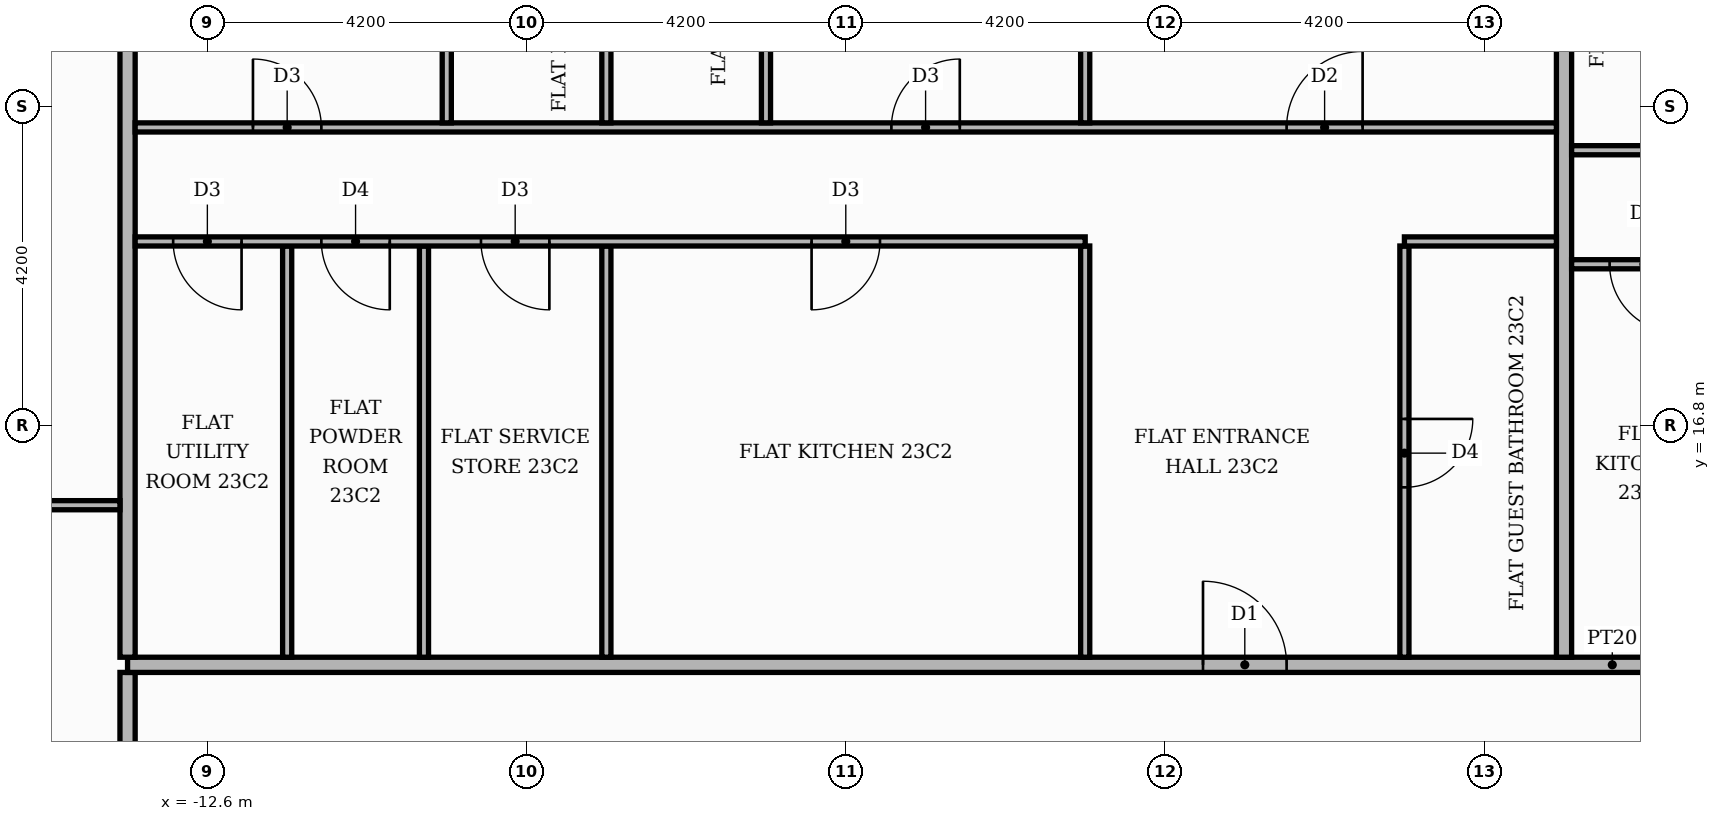
"""IFC4 building model, lengths in metres.
Left out: names, types, materials, properties, quantities, classifications, styles, units other than length and angle.
Written with IfcOpenShell. Run it as: python <this file> out.ifc"""

import sys

from ifc_helpers import new_model, si_unit, direction, frame, frame_2d, origin, place, context, subcontext, project, spatial, rectangle, extrude, element, fill, save


model = new_model("IFC4")
c1 = context("Model", 3, precision=1e-05, world=origin(), true_north=direction((0.0, 1.0)))
c2 = subcontext(c1, "Body", "Model", "MODEL_VIEW")
j1 = project(units=[si_unit("LENGTHUNIT", "METRE"), si_unit("PLANEANGLEUNIT", "RADIAN")], contexts=[c1])
p1 = place(None, origin())
s1 = spatial("IfcSite", under=j1, at=p1, CompositionType="ELEMENT")
p2 = place(p1, origin())
s2 = spatial("IfcBuilding", under=s1, at=p2, CompositionType="ELEMENT")
p3 = place(p2, frame((0.0, 0.0, 98.7)))
s3 = spatial("IfcBuildingStorey", under=s2, at=p3, CompositionType="ELEMENT", Elevation=98.7)
p4 = place(p3, frame((-13.65, -13.55, 0.0), z_axis=(0.0, 0.0, 1.0), x_axis=(0.0, 1.0, 0.0)))
e1 = element("IfcWall", 1, at=p4, inside=s3, PredefinedType="PARTITIONING", context=c2, shape_type="SweptSolid", body=[
    extrude(rectangle(XDim=27.1, YDim=0.2, at=frame_2d((13.55, 0.0))), origin(), (0.0, 0.0, 1.0), 3.48),
])
p5 = place(p4, frame((24.55, 0.0, 0.0)))
e2 = element("IfcOpeningElement", 2, at=p5, cuts=e1, PredefinedType="OPENING", context=c2, shape_type="SweptSolid", body=[
    extrude(rectangle(XDim=1.1, YDim=2.4, at=frame_2d((0.55, 1.2))), frame((0.0, 0.11, 0.0), z_axis=(0.0, -1.0, 0.0), x_axis=(1.0, 0.0, 0.0)), (0.0, 0.0, 1.0), 0.22),
])
p6 = place(p3, frame((-13.65, 13.65, 0.0), z_axis=(0.0, 0.0, 1.0), x_axis=(1.0, 0.0, 0.0)))
e3 = element("IfcWall", 3, at=p6, inside=s3, PredefinedType="PARTITIONING", context=c2, shape_type="SweptSolid", body=[
    extrude(rectangle(XDim=39.07, YDim=0.2, at=frame_2d((19.535, 0.0))), origin(), (0.0, 0.0, 1.0), 3.48),
])
p7 = place(p6, frame((24.65, 0.0, 0.0)))
e4 = element("IfcOpeningElement", 4, at=p7, cuts=e3, PredefinedType="OPENING", context=c2, shape_type="SweptSolid", body=[
    extrude(rectangle(XDim=1.1, YDim=2.4, at=frame_2d((0.55, 1.2))), frame((0.0, 0.11, 0.0), z_axis=(0.0, -1.0, 0.0), x_axis=(1.0, 0.0, 0.0)), (0.0, 0.0, 1.0), 0.22),
])
p8 = place(p6, frame((14.15, 0.0, 0.0)))
e5 = element("IfcOpeningElement", 5, at=p8, cuts=e3, PredefinedType="OPENING", context=c2, shape_type="SweptSolid", body=[
    extrude(rectangle(XDim=1.1, YDim=2.4, at=frame_2d((0.55, 1.2))), frame((0.0, 0.11, 0.0), z_axis=(0.0, -1.0, 0.0), x_axis=(1.0, 0.0, 0.0)), (0.0, 0.0, 1.0), 0.22),
])
p9 = place(p3, frame((-13.65, 13.75, 0.0), z_axis=(0.0, 0.0, 1.0), x_axis=(0.0, 1.0, 0.0)))
e6 = element("IfcWall", 6, at=p9, inside=s3, PredefinedType="PARTITIONING", context=c2, shape_type="SweptSolid", body=[
    extrude(rectangle(XDim=11.67, YDim=0.2, at=frame_2d((5.835, 0.0))), origin(), (0.0, 0.0, 1.0), 3.48),
])
for number, where, z_axis, x_axis in (
    (7, (-11.55, 13.75, 0.0), (0.0, 0.0, 1.0), (0.0, 1.0, 0.0)),
    (8, (-9.75, 13.75, 0.0), (0.0, 0.0, 1.0), (0.0, 1.0, 0.0)),
    (9, (-7.35, 13.75, 0.0), (0.0, 0.0, 1.0), (0.0, 1.0, 0.0)),
    (10, (-1.05, 13.75, 0.0), (0.0, 0.0, 1.0), (0.0, 1.0, 0.0)),
):
    element("IfcWall", number, at=place(p3, frame(where, z_axis=z_axis, x_axis=x_axis)), inside=s3, PredefinedType="PARTITIONING", context=c2, shape_type="SweptSolid", body=[
        extrude(rectangle(XDim=5.41, YDim=0.12, at=frame_2d((2.705, 0.0))), origin(), (0.0, 0.0, 1.0), 3.48),
    ])
p10 = place(p3, frame((3.15, 13.75, 0.0), z_axis=(0.0, 0.0, 1.0), x_axis=(0.0, 1.0, 0.0)))
e11 = element("IfcWall", 11, at=p10, inside=s3, PredefinedType="PARTITIONING", context=c2, shape_type="SweptSolid", body=[
    extrude(rectangle(XDim=5.41, YDim=0.12, at=frame_2d((2.705, 0.0))), origin(), (0.0, 0.0, 1.0), 3.48),
])
p11 = place(p10, frame((2.235, 0.0, 0.0)))
e12 = element("IfcOpeningElement", 12, at=p11, cuts=e11, PredefinedType="OPENING", context=c2, shape_type="SweptSolid", body=[
    extrude(rectangle(XDim=0.9, YDim=2.1, at=frame_2d((0.45, 1.05))), frame((0.0, 0.07, 0.0), z_axis=(0.0, -1.0, 0.0), x_axis=(1.0, 0.0, 0.0)), (0.0, 0.0, 1.0), 0.14),
])
p12 = place(p3, frame((5.25, 13.75, 0.0), z_axis=(0.0, 0.0, 1.0), x_axis=(0.0, 1.0, 0.0)))
e13 = element("IfcWall", 13, at=p12, inside=s3, PredefinedType="PARTITIONING", context=c2, shape_type="SweptSolid", body=[
    extrude(rectangle(XDim=11.67, YDim=0.2, at=frame_2d((5.835, 0.0))), origin(), (0.0, 0.0, 1.0), 3.48),
])
p13 = place(p3, frame((-20.42, 15.75, 0.0), z_axis=(0.0, 0.0, 1.0), x_axis=(1.0, 0.0, 0.0)))
e14 = element("IfcWall", 14, at=p13, inside=s3, PredefinedType="PARTITIONING", context=c2, shape_type="SweptSolid", body=[
    extrude(rectangle(XDim=6.67, YDim=0.12, at=frame_2d((3.335, 0.0))), origin(), (0.0, 0.0, 1.0), 3.48),
])
p14 = place(p13, frame((2.935, 0.0, 0.0)))
e15 = element("IfcOpeningElement", 15, at=p14, cuts=e14, PredefinedType="OPENING", context=c2, shape_type="SweptSolid", body=[
    extrude(rectangle(XDim=0.9, YDim=2.1, at=frame_2d((0.45, 1.05))), frame((0.0, 0.07, 0.0), z_axis=(0.0, -1.0, 0.0), x_axis=(1.0, 0.0, 0.0)), (0.0, 0.0, 1.0), 0.14),
])
p15 = place(p3, frame((5.35, 18.92, 0.0), z_axis=(0.0, 0.0, 1.0), x_axis=(1.0, 0.0, 0.0)))
e16 = element("IfcWall", 16, at=p15, inside=s3, PredefinedType="PARTITIONING", context=c2, shape_type="SweptSolid", body=[
    extrude(rectangle(XDim=4.1, YDim=0.12, at=frame_2d((2.05, 0.0))), origin(), (0.0, 0.0, 1.0), 3.48),
])
p16 = place(p15, frame((0.5, 0.0, 0.0)))
e17 = element("IfcOpeningElement", 17, at=p16, cuts=e16, PredefinedType="OPENING", context=c2, shape_type="SweptSolid", body=[
    extrude(rectangle(XDim=0.9, YDim=2.1, at=frame_2d((0.45, 1.05))), frame((0.0, 0.07, 0.0), z_axis=(0.0, -1.0, 0.0), x_axis=(1.0, 0.0, 0.0)), (0.0, 0.0, 1.0), 0.14),
])
p17 = place(p3, frame((-13.55, 19.22, 0.0), z_axis=(0.0, 0.0, 1.0), x_axis=(1.0, 0.0, 0.0)))
e18 = element("IfcWall", 18, at=p17, inside=s3, PredefinedType="PARTITIONING", context=c2, shape_type="SweptSolid", body=[
    extrude(rectangle(XDim=12.5, YDim=0.12, at=frame_2d((6.25, 0.0))), origin(), (0.0, 0.0, 1.0), 3.48),
])
p18 = place(p17, frame((8.9, 0.0, 0.0)))
e19 = element("IfcOpeningElement", 19, at=p18, cuts=e18, PredefinedType="OPENING", context=c2, shape_type="SweptSolid", body=[
    extrude(rectangle(XDim=0.9, YDim=2.1, at=frame_2d((0.45, 1.05))), frame((0.0, 0.07, 0.0), z_axis=(0.0, -1.0, 0.0), x_axis=(1.0, 0.0, 0.0)), (0.0, 0.0, 1.0), 0.14),
])
p19 = place(p17, frame((4.55, 0.0, 0.0)))
e20 = element("IfcOpeningElement", 20, at=p19, cuts=e18, PredefinedType="OPENING", context=c2, shape_type="SweptSolid", body=[
    extrude(rectangle(XDim=0.9, YDim=2.1, at=frame_2d((0.45, 1.05))), frame((0.0, 0.07, 0.0), z_axis=(0.0, -1.0, 0.0), x_axis=(1.0, 0.0, 0.0)), (0.0, 0.0, 1.0), 0.14),
])
p20 = place(p17, frame((2.45, 0.0, 0.0)))
e21 = element("IfcOpeningElement", 21, at=p20, cuts=e18, PredefinedType="OPENING", context=c2, shape_type="SweptSolid", body=[
    extrude(rectangle(XDim=0.9, YDim=2.1, at=frame_2d((0.45, 1.05))), frame((0.0, 0.07, 0.0), z_axis=(0.0, -1.0, 0.0), x_axis=(1.0, 0.0, 0.0)), (0.0, 0.0, 1.0), 0.14),
])
p21 = place(p17, frame((0.5, 0.0, 0.0)))
e22 = element("IfcOpeningElement", 22, at=p21, cuts=e18, PredefinedType="OPENING", context=c2, shape_type="SweptSolid", body=[
    extrude(rectangle(XDim=0.9, YDim=2.1, at=frame_2d((0.45, 1.05))), frame((0.0, 0.07, 0.0), z_axis=(0.0, -1.0, 0.0), x_axis=(1.0, 0.0, 0.0)), (0.0, 0.0, 1.0), 0.14),
])
p22 = place(p3, frame((3.15, 19.22, 0.0), z_axis=(0.0, 0.0, 1.0), x_axis=(1.0, 0.0, 0.0)))
e23 = element("IfcWall", 23, at=p22, inside=s3, PredefinedType="PARTITIONING", context=c2, shape_type="SweptSolid", body=[
    extrude(rectangle(XDim=2.0, YDim=0.12, at=frame_2d((1.0, 0.0))), origin(), (0.0, 0.0, 1.0), 3.48),
])
p23 = place(p3, frame((5.35, 20.42, 0.0), z_axis=(0.0, 0.0, 1.0), x_axis=(1.0, 0.0, 0.0)))
e24 = element("IfcWall", 24, at=p23, inside=s3, PredefinedType="PARTITIONING", context=c2, shape_type="SweptSolid", body=[
    extrude(rectangle(XDim=20.07, YDim=0.12, at=frame_2d((10.035, 0.0))), origin(), (0.0, 0.0, 1.0), 3.48),
])
p24 = place(p23, frame((8.85, 0.0, 0.0)))
e25 = element("IfcOpeningElement", 25, at=p24, cuts=e24, PredefinedType="OPENING", context=c2, shape_type="SweptSolid", body=[
    extrude(rectangle(XDim=1.0, YDim=2.1, at=frame_2d((0.5, 1.05))), frame((0.0, 0.07, 0.0), z_axis=(0.0, -1.0, 0.0), x_axis=(1.0, 0.0, 0.0)), (0.0, 0.0, 1.0), 0.14),
])
p25 = place(p23, frame((5.75, 0.0, 0.0)))
e26 = element("IfcOpeningElement", 26, at=p25, cuts=e24, PredefinedType="OPENING", context=c2, shape_type="SweptSolid", body=[
    extrude(rectangle(XDim=0.9, YDim=2.1, at=frame_2d((0.45, 1.05))), frame((0.0, 0.07, 0.0), z_axis=(0.0, -1.0, 0.0), x_axis=(1.0, 0.0, 0.0)), (0.0, 0.0, 1.0), 0.14),
])
p26 = place(p3, frame((-13.55, 20.72, 0.0), z_axis=(0.0, 0.0, 1.0), x_axis=(1.0, 0.0, 0.0)))
e27 = element("IfcWall", 27, at=p26, inside=s3, PredefinedType="PARTITIONING", context=c2, shape_type="SweptSolid", body=[
    extrude(rectangle(XDim=18.7, YDim=0.12, at=frame_2d((9.35, 0.0))), origin(), (0.0, 0.0, 1.0), 3.48),
])
p27 = place(p26, frame((15.15, 0.0, 0.0)))
e28 = element("IfcOpeningElement", 28, at=p27, cuts=e27, PredefinedType="OPENING", context=c2, shape_type="SweptSolid", body=[
    extrude(rectangle(XDim=1.0, YDim=2.1, at=frame_2d((0.5, 1.05))), frame((0.0, 0.07, 0.0), z_axis=(0.0, -1.0, 0.0), x_axis=(1.0, 0.0, 0.0)), (0.0, 0.0, 1.0), 0.14),
])
p28 = place(p26, frame((9.95, 0.0, 0.0)))
e29 = element("IfcOpeningElement", 29, at=p28, cuts=e27, PredefinedType="OPENING", context=c2, shape_type="SweptSolid", body=[
    extrude(rectangle(XDim=0.9, YDim=2.1, at=frame_2d((0.45, 1.05))), frame((0.0, 0.07, 0.0), z_axis=(0.0, -1.0, 0.0), x_axis=(1.0, 0.0, 0.0)), (0.0, 0.0, 1.0), 0.14),
])
p29 = place(p26, frame((1.55, 0.0, 0.0)))
e30 = element("IfcOpeningElement", 30, at=p29, cuts=e27, PredefinedType="OPENING", context=c2, shape_type="SweptSolid", body=[
    extrude(rectangle(XDim=0.9, YDim=2.1, at=frame_2d((0.45, 1.05))), frame((0.0, 0.07, 0.0), z_axis=(0.0, -1.0, 0.0), x_axis=(1.0, 0.0, 0.0)), (0.0, 0.0, 1.0), 0.14),
])
p30 = place(p3, frame((-9.45, 20.78, 0.0), z_axis=(0.0, 0.0, 1.0), x_axis=(0.0, 1.0, 0.0)))
e31 = element("IfcWall", 31, at=p30, inside=s3, PredefinedType="PARTITIONING", context=c2, shape_type="SweptSolid", body=[
    extrude(rectangle(XDim=4.64, YDim=0.12, at=frame_2d((2.32, 0.0))), origin(), (0.0, 0.0, 1.0), 3.48),
])
p31 = place(p3, frame((-7.35, 20.78, 0.0), z_axis=(0.0, 0.0, 1.0), x_axis=(0.0, 1.0, 0.0)))
e32 = element("IfcWall", 32, at=p31, inside=s3, PredefinedType="PARTITIONING", context=c2, shape_type="SweptSolid", body=[
    extrude(rectangle(XDim=4.64, YDim=0.12, at=frame_2d((2.32, 0.0))), origin(), (0.0, 0.0, 1.0), 3.48),
])
p32 = place(p31, frame((1.99, 0.0, 0.0)))
e33 = element("IfcOpeningElement", 33, at=p32, cuts=e32, PredefinedType="OPENING", context=c2, shape_type="SweptSolid", body=[
    extrude(rectangle(XDim=0.9, YDim=2.1, at=frame_2d((0.45, 1.05))), frame((0.0, 0.07, 0.0), z_axis=(0.0, -1.0, 0.0), x_axis=(1.0, 0.0, 0.0)), (0.0, 0.0, 1.0), 0.14),
])
p33 = place(p3, frame((-5.25, 20.78, 0.0), z_axis=(0.0, 0.0, 1.0), x_axis=(0.0, 1.0, 0.0)))
e34 = element("IfcWall", 34, at=p33, inside=s3, PredefinedType="PARTITIONING", context=c2, shape_type="SweptSolid", body=[
    extrude(rectangle(XDim=4.64, YDim=0.12, at=frame_2d((2.32, 0.0))), origin(), (0.0, 0.0, 1.0), 3.48),
])
p34 = place(p33, frame((1.99, 0.0, 0.0)))
e35 = element("IfcOpeningElement", 35, at=p34, cuts=e34, PredefinedType="OPENING", context=c2, shape_type="SweptSolid", body=[
    extrude(rectangle(XDim=0.9, YDim=2.1, at=frame_2d((0.45, 1.05))), frame((0.0, 0.07, 0.0), z_axis=(0.0, -1.0, 0.0), x_axis=(1.0, 0.0, 0.0)), (0.0, 0.0, 1.0), 0.14),
])
p35 = place(p3, frame((-1.05, 20.78, 0.0), z_axis=(0.0, 0.0, 1.0), x_axis=(0.0, 1.0, 0.0)))
e36 = element("IfcWall", 36, at=p35, inside=s3, PredefinedType="PARTITIONING", context=c2, shape_type="SweptSolid", body=[
    extrude(rectangle(XDim=4.64, YDim=0.12, at=frame_2d((2.32, 0.0))), origin(), (0.0, 0.0, 1.0), 3.48),
])
p36 = place(p16, frame((0.9, 0.0, 0.0), z_axis=(0.0, 0.0, 1.0), x_axis=(-1.0, 0.0, 0.0)))
e37 = element("IfcDoor", 37, at=p36, inside=s3, OperationType="SINGLE_SWING_RIGHT", PredefinedType="DOOR", context=c2, shape_type="SweptSolid", body=[
    extrude(rectangle(XDim=0.9, YDim=2.1, at=frame_2d((0.45, 1.05))), frame((0.0, 0.025, 0.0), z_axis=(0.0, -1.0, 0.0), x_axis=(1.0, 0.0, 0.0)), (0.0, 0.0, 1.0), 0.05),
])
fill(e17, e37)
p37 = place(p8, origin())
e38 = element("IfcDoor", 38, at=p37, inside=s3, OperationType="SINGLE_SWING_LEFT", PredefinedType="DOOR", context=c2, shape_type="SweptSolid", body=[
    extrude(rectangle(XDim=1.1, YDim=2.4, at=frame_2d((0.55, 1.2))), frame((0.0, 0.025, 0.0), z_axis=(0.0, -1.0, 0.0), x_axis=(1.0, 0.0, 0.0)), (0.0, 0.0, 1.0), 0.05),
])
fill(e5, e38)
p38 = place(p11, frame((0.9, 0.0, 0.0), z_axis=(0.0, 0.0, 1.0), x_axis=(-1.0, 0.0, 0.0)))
e39 = element("IfcDoor", 39, at=p38, inside=s3, OperationType="SINGLE_SWING_RIGHT", PredefinedType="DOOR", context=c2, shape_type="SweptSolid", body=[
    extrude(rectangle(XDim=0.9, YDim=2.1, at=frame_2d((0.45, 1.05))), frame((0.0, 0.025, 0.0), z_axis=(0.0, -1.0, 0.0), x_axis=(1.0, 0.0, 0.0)), (0.0, 0.0, 1.0), 0.05),
])
fill(e12, e39)
p39 = place(p18, frame((0.9, 0.0, 0.0), z_axis=(0.0, 0.0, 1.0), x_axis=(-1.0, 0.0, 0.0)))
e40 = element("IfcDoor", 40, at=p39, inside=s3, OperationType="SINGLE_SWING_LEFT", PredefinedType="DOOR", context=c2, shape_type="SweptSolid", body=[
    extrude(rectangle(XDim=0.9, YDim=2.1, at=frame_2d((0.45, 1.05))), frame((0.0, 0.025, 0.0), z_axis=(0.0, -1.0, 0.0), x_axis=(1.0, 0.0, 0.0)), (0.0, 0.0, 1.0), 0.05),
])
fill(e19, e40)
p40 = place(p19, frame((0.9, 0.0, 0.0), z_axis=(0.0, 0.0, 1.0), x_axis=(-1.0, 0.0, 0.0)))
e41 = element("IfcDoor", 41, at=p40, inside=s3, OperationType="SINGLE_SWING_RIGHT", PredefinedType="DOOR", context=c2, shape_type="SweptSolid", body=[
    extrude(rectangle(XDim=0.9, YDim=2.1, at=frame_2d((0.45, 1.05))), frame((0.0, 0.025, 0.0), z_axis=(0.0, -1.0, 0.0), x_axis=(1.0, 0.0, 0.0)), (0.0, 0.0, 1.0), 0.05),
])
fill(e20, e41)
p41 = place(p20, frame((0.9, 0.0, 0.0), z_axis=(0.0, 0.0, 1.0), x_axis=(-1.0, 0.0, 0.0)))
e42 = element("IfcDoor", 42, at=p41, inside=s3, OperationType="SINGLE_SWING_RIGHT", PredefinedType="DOOR", context=c2, shape_type="SweptSolid", body=[
    extrude(rectangle(XDim=0.9, YDim=2.1, at=frame_2d((0.45, 1.05))), frame((0.0, 0.025, 0.0), z_axis=(0.0, -1.0, 0.0), x_axis=(1.0, 0.0, 0.0)), (0.0, 0.0, 1.0), 0.05),
])
fill(e21, e42)
p42 = place(p21, frame((0.9, 0.0, 0.0), z_axis=(0.0, 0.0, 1.0), x_axis=(-1.0, 0.0, 0.0)))
e43 = element("IfcDoor", 43, at=p42, inside=s3, OperationType="SINGLE_SWING_RIGHT", PredefinedType="DOOR", context=c2, shape_type="SweptSolid", body=[
    extrude(rectangle(XDim=0.9, YDim=2.1, at=frame_2d((0.45, 1.05))), frame((0.0, 0.025, 0.0), z_axis=(0.0, -1.0, 0.0), x_axis=(1.0, 0.0, 0.0)), (0.0, 0.0, 1.0), 0.05),
])
fill(e22, e43)
p43 = place(p27, origin())
e44 = element("IfcDoor", 44, at=p43, inside=s3, OperationType="SINGLE_SWING_RIGHT", PredefinedType="DOOR", context=c2, shape_type="SweptSolid", body=[
    extrude(rectangle(XDim=1.0, YDim=2.1, at=frame_2d((0.5, 1.05))), frame((0.0, 0.025, 0.0), z_axis=(0.0, -1.0, 0.0), x_axis=(1.0, 0.0, 0.0)), (0.0, 0.0, 1.0), 0.05),
])
fill(e28, e44)
p44 = place(p28, origin())
e45 = element("IfcDoor", 45, at=p44, inside=s3, OperationType="SINGLE_SWING_RIGHT", PredefinedType="DOOR", context=c2, shape_type="SweptSolid", body=[
    extrude(rectangle(XDim=0.9, YDim=2.1, at=frame_2d((0.45, 1.05))), frame((0.0, 0.025, 0.0), z_axis=(0.0, -1.0, 0.0), x_axis=(1.0, 0.0, 0.0)), (0.0, 0.0, 1.0), 0.05),
])
fill(e29, e45)
p45 = place(p29, origin())
e46 = element("IfcDoor", 46, at=p45, inside=s3, OperationType="SINGLE_SWING_LEFT", PredefinedType="DOOR", context=c2, shape_type="SweptSolid", body=[
    extrude(rectangle(XDim=0.9, YDim=2.1, at=frame_2d((0.45, 1.05))), frame((0.0, 0.025, 0.0), z_axis=(0.0, -1.0, 0.0), x_axis=(1.0, 0.0, 0.0)), (0.0, 0.0, 1.0), 0.05),
])
fill(e30, e46)
save(model, sys.argv[1])
